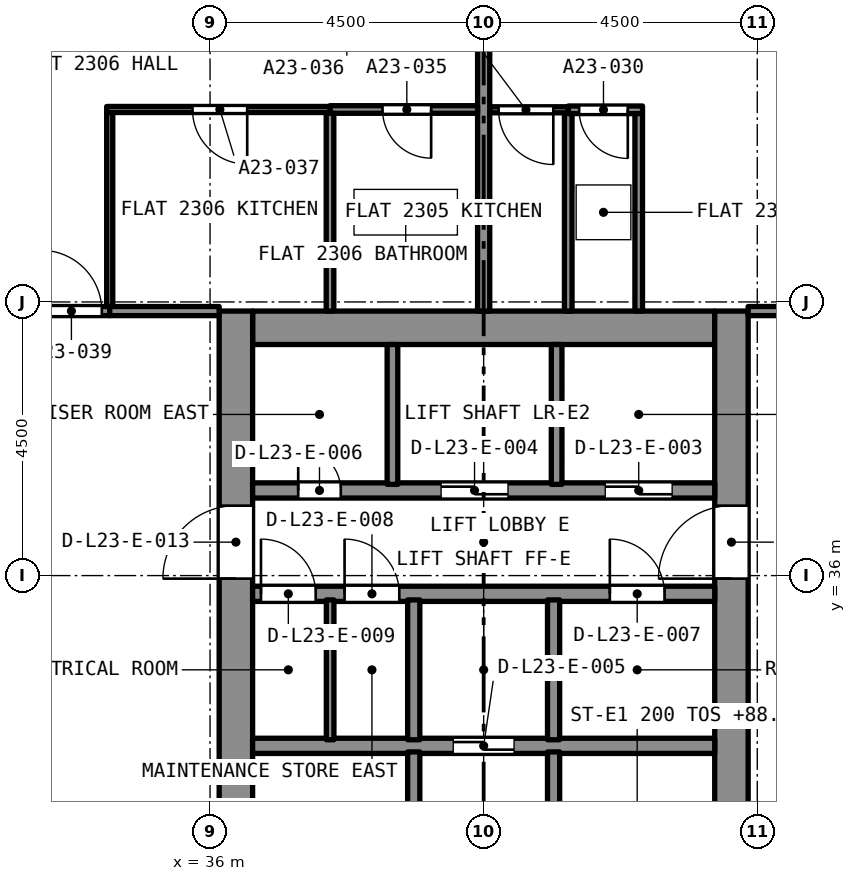
"""IFC4 building model, lengths in metres.
Left out: names, types, materials, properties, quantities, classifications, styles, units other than length and angle.
Written with IfcOpenShell. Run it as: python <this file> out.ifc"""

import sys

from ifc_helpers import new_model, si_unit, direction, frame, frame_2d, origin, place, context, subcontext, project, spatial, rectangle, extrude, element, fill, save


model = new_model("IFC4")
c1 = context("Model", 3, precision=1e-05, world=origin(), true_north=direction((0.0, 1.0)))
c2 = subcontext(c1, "Body", "Model", "MODEL_VIEW")
j1 = project(units=[si_unit("LENGTHUNIT", "METRE"), si_unit("PLANEANGLEUNIT", "RADIAN")], contexts=[c1])
p1 = place(None, origin())
s1 = spatial("IfcSite", under=j1, at=p1, CompositionType="ELEMENT")
p2 = place(p1, origin())
s2 = spatial("IfcBuilding", under=s1, at=p2, CompositionType="ELEMENT")
p3 = place(p2, frame((0.0, 0.0, 86.4)))
s3 = spatial("IfcBuildingStorey", under=s2, at=p3, CompositionType="ELEMENT", Elevation=86.4)
p4 = place(p3, frame((36.7, 40.075, 0.0), z_axis=(0.0, 0.0, 1.0), x_axis=(1.0, 0.0, 0.0)))
e1 = element("IfcWall", 1, at=p4, inside=s3, PredefinedType="SOLIDWALL", context=c2, shape_type="SweptSolid", body=[
    extrude(rectangle(XDim=7.6, YDim=0.55, at=frame_2d((3.8, 0.0))), origin(), (0.0, 0.0, 1.0), 3.2),
])
p5 = place(p3, frame((36.425, 27.15, 0.0), z_axis=(0.0, 0.0, 1.0), x_axis=(0.0, 1.0, 0.0)))
e2 = element("IfcWall", 2, at=p5, inside=s3, PredefinedType="SOLIDWALL", context=c2, shape_type="SweptSolid", body=[
    extrude(rectangle(XDim=13.2, YDim=0.55, at=frame_2d((6.6, 0.0))), origin(), (0.0, 0.0, 1.0), 3.2),
])
p6 = place(p5, frame((8.8, 0.0, 0.0)))
e3 = element("IfcOpeningElement", 3, at=p6, cuts=e2, PredefinedType="OPENING", context=c2, shape_type="SweptSolid", body=[
    extrude(rectangle(XDim=1.2, YDim=2.1, at=frame_2d((0.6, 1.05))), frame((0.0, 0.285, 0.0), z_axis=(0.0, -1.0, 0.0), x_axis=(1.0, 0.0, 0.0)), (0.0, 0.0, 1.0), 0.57),
])
p7 = place(p3, frame((44.575, 27.15, 0.0), z_axis=(0.0, 0.0, 1.0), x_axis=(0.0, 1.0, 0.0)))
e4 = element("IfcWall", 4, at=p7, inside=s3, PredefinedType="SOLIDWALL", context=c2, shape_type="SweptSolid", body=[
    extrude(rectangle(XDim=13.2, YDim=0.55, at=frame_2d((6.6, 0.0))), origin(), (0.0, 0.0, 1.0), 3.2),
])
p8 = place(p7, frame((8.8, 0.0, 0.0)))
e5 = element("IfcOpeningElement", 5, at=p8, cuts=e4, PredefinedType="OPENING", context=c2, shape_type="SweptSolid", body=[
    extrude(rectangle(XDim=1.2, YDim=2.1, at=frame_2d((0.6, 1.05))), frame((0.0, 0.285, 0.0), z_axis=(0.0, -1.0, 0.0), x_axis=(1.0, 0.0, 0.0)), (0.0, 0.0, 1.0), 0.57),
])
p9 = place(p3, frame((43.113, 43.66, 0.0), z_axis=(0.0, 0.0, 1.0), x_axis=(-1.0, 0.0, 0.0)))
e6 = element("IfcWall", 6, at=p9, inside=s3, PredefinedType="PARTITIONING", context=c2, shape_type="SweptSolid", body=[
    extrude(rectangle(XDim=1.222, YDim=0.125, at=frame_2d((0.611, 0.0))), origin(), (0.0, 0.0, 1.0), 2.9),
])
p10 = place(p9, frame((0.242, 0.0, 0.0)))
e7 = element("IfcOpeningElement", 7, at=p10, cuts=e6, PredefinedType="OPENING", context=c2, shape_type="SweptSolid", body=[
    extrude(rectangle(XDim=0.8, YDim=2.1, at=frame_2d((0.4, 1.05))), frame((0.0, 0.073, 0.0), z_axis=(0.0, -1.0, 0.0), x_axis=(1.0, 0.0, 0.0)), (0.0, 0.0, 1.0), 0.145),
])
for number, where, z_axis, x_axis in (
    (8, (43.05, 40.35, 0.0), (0.0, 0.0, 1.0), (0.0, 1.0, 0.0)),
    (9, (41.891, 40.35, 0.0), (0.0, 0.0, 1.0), (0.0, 1.0, 0.0)),
):
    element("IfcWall", number, at=place(p3, frame(where, z_axis=z_axis, x_axis=x_axis)), inside=s3, PredefinedType="PARTITIONING", context=c2, shape_type="SweptSolid", body=[
        extrude(rectangle(XDim=3.247, YDim=0.125, at=frame_2d((1.624, 0.0))), origin(), (0.0, 0.0, 1.0), 2.9),
    ])
p11 = place(p3, frame((41.891, 43.66, 0.0), z_axis=(0.0, 0.0, 1.0), x_axis=(-1.0, 0.0, 0.0)))
e10 = element("IfcWall", 10, at=p11, inside=s3, PredefinedType="PARTITIONING", context=c2, shape_type="SweptSolid", body=[
    extrude(rectangle(XDim=1.291, YDim=0.1, at=frame_2d((0.646, 0.0))), origin(), (0.0, 0.0, 1.0), 2.9),
])
p12 = place(p11, frame((0.246, 0.0, 0.0)))
e11 = element("IfcOpeningElement", 11, at=p12, cuts=e10, PredefinedType="OPENING", context=c2, shape_type="SweptSolid", body=[
    extrude(rectangle(XDim=0.9, YDim=2.1, at=frame_2d((0.45, 1.05))), frame((0.0, 0.06, 0.0), z_axis=(0.0, -1.0, 0.0), x_axis=(1.0, 0.0, 0.0)), (0.0, 0.0, 1.0), 0.12),
])
p13 = place(p3, frame((44.85, 40.35, 0.0), z_axis=(0.0, 0.0, 1.0), x_axis=(1.0, 0.0, 0.0)))
e12 = element("IfcWall", 12, at=p13, inside=s3, PredefinedType="PARTITIONING", context=c2, shape_type="SweptSolid", body=[
    extrude(rectangle(XDim=4.075, YDim=0.15, at=frame_2d((2.038, 0.0))), origin(), (0.0, 0.0, 1.0), 2.9),
])
p14 = place(p13, frame((1.9, 0.0, 0.0)))
e13 = element("IfcOpeningElement", 13, at=p14, cuts=e12, PredefinedType="OPENING", context=c2, shape_type="SweptSolid", body=[
    extrude(rectangle(XDim=1.0, YDim=2.1, at=frame_2d((0.5, 1.05))), frame((0.0, 0.085, 0.0), z_axis=(0.0, -1.0, 0.0), x_axis=(1.0, 0.0, 0.0)), (0.0, 0.0, 1.0), 0.17),
])
p15 = place(p3, frame((40.5, 40.35, 0.0), z_axis=(0.0, 0.0, 1.0), x_axis=(0.0, 1.0, 0.0)))
e14 = element("IfcWall", 14, at=p15, inside=s3, PredefinedType="PARTITIONING", context=c2, shape_type="SweptSolid", body=[
    extrude(rectangle(XDim=4.7, YDim=0.2, at=frame_2d((2.35, 0.0))), origin(), (0.0, 0.0, 1.0), 2.9),
])
p16 = place(p3, frame((40.4, 43.665, 0.0), z_axis=(0.0, 0.0, 1.0), x_axis=(-1.0, 0.0, 0.0)))
e15 = element("IfcWall", 15, at=p16, inside=s3, PredefinedType="PARTITIONING", context=c2, shape_type="SweptSolid", body=[
    extrude(rectangle(XDim=2.427, YDim=0.125, at=frame_2d((1.214, 0.0))), origin(), (0.0, 0.0, 1.0), 2.9),
])
p17 = place(p16, frame((0.764, 0.0, 0.0)))
e16 = element("IfcOpeningElement", 16, at=p17, cuts=e15, PredefinedType="OPENING", context=c2, shape_type="SweptSolid", body=[
    extrude(rectangle(XDim=0.8, YDim=2.1, at=frame_2d((0.4, 1.05))), frame((0.0, 0.073, 0.0), z_axis=(0.0, -1.0, 0.0), x_axis=(1.0, 0.0, 0.0)), (0.0, 0.0, 1.0), 0.145),
])
p18 = place(p3, frame((37.973, 40.35, 0.0), z_axis=(0.0, 0.0, 1.0), x_axis=(0.0, 1.0, 0.0)))
e17 = element("IfcWall", 17, at=p18, inside=s3, PredefinedType="PARTITIONING", context=c2, shape_type="SweptSolid", body=[
    extrude(rectangle(XDim=3.252, YDim=0.125, at=frame_2d((1.626, 0.0))), origin(), (0.0, 0.0, 1.0), 2.9),
])
p19 = place(p3, frame((37.973, 43.665, 0.0), z_axis=(0.0, 0.0, 1.0), x_axis=(-1.0, 0.0, 0.0)))
e18 = element("IfcWall", 18, at=p19, inside=s3, PredefinedType="PARTITIONING", context=c2, shape_type="SweptSolid", body=[
    extrude(rectangle(XDim=3.673, YDim=0.1, at=frame_2d((1.836, 0.0))), origin(), (0.0, 0.0, 1.0), 2.9),
])
p20 = place(p19, frame((1.361, 0.0, 0.0)))
e19 = element("IfcOpeningElement", 19, at=p20, cuts=e18, PredefinedType="OPENING", context=c2, shape_type="SweptSolid", body=[
    extrude(rectangle(XDim=0.9, YDim=2.1, at=frame_2d((0.45, 1.05))), frame((0.0, 0.06, 0.0), z_axis=(0.0, -1.0, 0.0), x_axis=(1.0, 0.0, 0.0)), (0.0, 0.0, 1.0), 0.12),
])
p21 = place(p3, frame((34.35, 40.425, 0.0), z_axis=(0.0, 0.0, 1.0), x_axis=(0.0, 1.0, 0.0)))
e20 = element("IfcWall", 20, at=p21, inside=s3, PredefinedType="PARTITIONING", context=c2, shape_type="SweptSolid", body=[
    extrude(rectangle(XDim=3.19, YDim=0.1, at=frame_2d((1.595, 0.0))), origin(), (0.0, 0.0, 1.0), 2.9),
])
p22 = place(p3, frame((32.075, 40.35, 0.0), z_axis=(0.0, 0.0, 1.0), x_axis=(1.0, 0.0, 0.0)))
e21 = element("IfcWall", 21, at=p22, inside=s3, PredefinedType="PARTITIONING", context=c2, shape_type="SweptSolid", body=[
    extrude(rectangle(XDim=2.275, YDim=0.15, at=frame_2d((1.138, 0.0))), origin(), (0.0, 0.0, 1.0), 2.9),
])
p23 = place(p22, frame((1.145, 0.0, 0.0)))
e22 = element("IfcOpeningElement", 22, at=p23, cuts=e21, PredefinedType="OPENING", context=c2, shape_type="SweptSolid", body=[
    extrude(rectangle(XDim=1.0, YDim=2.1, at=frame_2d((0.5, 1.05))), frame((0.0, 0.085, 0.0), z_axis=(0.0, -1.0, 0.0), x_axis=(1.0, 0.0, 0.0)), (0.0, 0.0, 1.0), 0.17),
])
p24 = place(p3, frame((34.35, 40.35, 0.0), z_axis=(0.0, 0.0, 1.0), x_axis=(1.0, 0.0, 0.0)))
e23 = element("IfcWall", 23, at=p24, inside=s3, PredefinedType="PARTITIONING", context=c2, shape_type="SweptSolid", body=[
    extrude(rectangle(XDim=1.8, YDim=0.15, at=frame_2d((0.9, 0.0))), origin(), (0.0, 0.0, 1.0), 2.9),
])
p25 = place(p3, frame((36.7, 33.2, 0.0), z_axis=(0.0, 0.0, 1.0), x_axis=(1.0, 0.0, 0.0)))
e24 = element("IfcWall", 24, at=p25, inside=s3, PredefinedType="SOLIDWALL", context=c2, shape_type="SweptSolid", body=[
    extrude(rectangle(XDim=7.6, YDim=0.25, at=frame_2d((3.8, 0.0))), origin(), (0.0, 0.0, 1.0), 2.9),
])
p26 = place(p25, frame((3.3, 0.0, 0.0)))
e25 = element("IfcOpeningElement", 25, at=p26, cuts=e24, PredefinedType="OPENING", context=c2, shape_type="SweptSolid", body=[
    extrude(rectangle(XDim=1.0, YDim=2.1, at=frame_2d((0.5, 1.05))), frame((0.0, 0.135, 0.0), z_axis=(0.0, -1.0, 0.0), x_axis=(1.0, 0.0, 0.0)), (0.0, 0.0, 1.0), 0.27),
])
p27 = place(p3, frame((36.7, 35.7, 0.0), z_axis=(0.0, 0.0, 1.0), x_axis=(1.0, 0.0, 0.0)))
e26 = element("IfcWall", 26, at=p27, inside=s3, PredefinedType="SOLIDWALL", context=c2, shape_type="SweptSolid", body=[
    extrude(rectangle(XDim=7.6, YDim=0.25, at=frame_2d((3.8, 0.0))), origin(), (0.0, 0.0, 1.0), 2.9),
])
p28 = place(p27, frame((5.875, 0.0, 0.0)))
e27 = element("IfcOpeningElement", 27, at=p28, cuts=e26, PredefinedType="OPENING", context=c2, shape_type="SweptSolid", body=[
    extrude(rectangle(XDim=0.9, YDim=2.1, at=frame_2d((0.45, 1.05))), frame((0.0, 0.135, 0.0), z_axis=(0.0, -1.0, 0.0), x_axis=(1.0, 0.0, 0.0)), (0.0, 0.0, 1.0), 0.27),
])
p29 = place(p27, frame((1.512, 0.0, 0.0)))
e28 = element("IfcOpeningElement", 28, at=p29, cuts=e26, PredefinedType="OPENING", context=c2, shape_type="SweptSolid", body=[
    extrude(rectangle(XDim=0.9, YDim=2.1, at=frame_2d((0.45, 1.05))), frame((0.0, 0.135, 0.0), z_axis=(0.0, -1.0, 0.0), x_axis=(1.0, 0.0, 0.0)), (0.0, 0.0, 1.0), 0.27),
])
p30 = place(p27, frame((0.137, 0.0, 0.0)))
e29 = element("IfcOpeningElement", 29, at=p30, cuts=e26, PredefinedType="OPENING", context=c2, shape_type="SweptSolid", body=[
    extrude(rectangle(XDim=0.9, YDim=2.1, at=frame_2d((0.45, 1.05))), frame((0.0, 0.135, 0.0), z_axis=(0.0, -1.0, 0.0), x_axis=(1.0, 0.0, 0.0)), (0.0, 0.0, 1.0), 0.27),
])
p31 = place(p3, frame((36.7, 37.4, 0.0), z_axis=(0.0, 0.0, 1.0), x_axis=(1.0, 0.0, 0.0)))
e30 = element("IfcWall", 30, at=p31, inside=s3, PredefinedType="SOLIDWALL", context=c2, shape_type="SweptSolid", body=[
    extrude(rectangle(XDim=7.6, YDim=0.25, at=frame_2d((3.8, 0.0))), origin(), (0.0, 0.0, 1.0), 2.9),
])
p32 = place(p31, frame((5.8, 0.0, 0.0)))
e31 = element("IfcOpeningElement", 31, at=p32, cuts=e30, PredefinedType="OPENING", context=c2, shape_type="SweptSolid", body=[
    extrude(rectangle(XDim=1.1, YDim=2.4, at=frame_2d((0.55, 1.2))), frame((0.0, 0.135, 0.0), z_axis=(0.0, -1.0, 0.0), x_axis=(1.0, 0.0, 0.0)), (0.0, 0.0, 1.0), 0.27),
])
p33 = place(p31, frame((3.1, 0.0, 0.0)))
e32 = element("IfcOpeningElement", 32, at=p33, cuts=e30, PredefinedType="OPENING", context=c2, shape_type="SweptSolid", body=[
    extrude(rectangle(XDim=1.1, YDim=2.4, at=frame_2d((0.55, 1.2))), frame((0.0, 0.135, 0.0), z_axis=(0.0, -1.0, 0.0), x_axis=(1.0, 0.0, 0.0)), (0.0, 0.0, 1.0), 0.27),
])
p34 = place(p31, frame((0.75, 0.0, 0.0)))
e33 = element("IfcOpeningElement", 33, at=p34, cuts=e30, PredefinedType="OPENING", context=c2, shape_type="SweptSolid", body=[
    extrude(rectangle(XDim=0.7, YDim=2.1, at=frame_2d((0.35, 1.05))), frame((0.0, 0.135, 0.0), z_axis=(0.0, -1.0, 0.0), x_axis=(1.0, 0.0, 0.0)), (0.0, 0.0, 1.0), 0.27),
])
p35 = place(p3, frame((41.65, 27.7, 0.0), z_axis=(0.0, 0.0, 1.0), x_axis=(0.0, 1.0, 0.0)))
e34 = element("IfcWall", 34, at=p35, inside=s3, PredefinedType="SOLIDWALL", context=c2, shape_type="SweptSolid", body=[
    extrude(rectangle(XDim=5.4, YDim=0.2, at=frame_2d((2.7, 0.0))), origin(), (0.0, 0.0, 1.0), 2.9),
])
p36 = place(p35, frame((0.2, 0.0, 0.0)))
e35 = element("IfcOpeningElement", 35, at=p36, cuts=e34, PredefinedType="OPENING", context=c2, shape_type="SweptSolid", body=[
    extrude(rectangle(XDim=0.9, YDim=2.1, at=frame_2d((0.45, 1.05))), frame((0.0, 0.11, 0.0), z_axis=(0.0, -1.0, 0.0), x_axis=(1.0, 0.0, 0.0)), (0.0, 0.0, 1.0), 0.22),
])
p37 = place(p3, frame((39.35, 27.7, 0.0), z_axis=(0.0, 0.0, 1.0), x_axis=(0.0, 1.0, 0.0)))
e36 = element("IfcWall", 36, at=p37, inside=s3, PredefinedType="SOLIDWALL", context=c2, shape_type="SweptSolid", body=[
    extrude(rectangle(XDim=5.4, YDim=0.2, at=frame_2d((2.7, 0.0))), origin(), (0.0, 0.0, 1.0), 2.9),
])
p38 = place(p37, frame((0.2, 0.0, 0.0)))
e37 = element("IfcOpeningElement", 37, at=p38, cuts=e36, PredefinedType="OPENING", context=c2, shape_type="SweptSolid", body=[
    extrude(rectangle(XDim=0.9, YDim=2.1, at=frame_2d((0.45, 1.05))), frame((0.0, 0.11, 0.0), z_axis=(0.0, -1.0, 0.0), x_axis=(1.0, 0.0, 0.0)), (0.0, 0.0, 1.0), 0.22),
])
for number, where, z_axis, x_axis in (
    (38, (41.65, 33.3, 0.0), (0.0, 0.0, 1.0), (0.0, 1.0, 0.0)),
    (39, (39.35, 33.3, 0.0), (0.0, 0.0, 1.0), (0.0, 1.0, 0.0)),
):
    element("IfcWall", number, at=place(p3, frame(where, z_axis=z_axis, x_axis=x_axis)), inside=s3, PredefinedType="SOLIDWALL", context=c2, shape_type="SweptSolid", body=[
        extrude(rectangle(XDim=2.3, YDim=0.2, at=frame_2d((1.15, 0.0))), origin(), (0.0, 0.0, 1.0), 2.9),
    ])
for number, where, z_axis, x_axis in (
    (40, (41.7, 37.5, 0.0), (0.0, 0.0, 1.0), (0.0, 1.0, 0.0)),
    (41, (39.0, 37.5, 0.0), (0.0, 0.0, 1.0), (0.0, 1.0, 0.0)),
):
    element("IfcWall", number, at=place(p3, frame(where, z_axis=z_axis, x_axis=x_axis)), inside=s3, PredefinedType="SOLIDWALL", context=c2, shape_type="SweptSolid", body=[
        extrude(rectangle(XDim=2.3, YDim=0.175, at=frame_2d((1.15, 0.0))), origin(), (0.0, 0.0, 1.0), 2.9),
    ])
p39 = place(p3, frame((37.975, 33.3, 0.0), z_axis=(0.0, 0.0, 1.0), x_axis=(0.0, 1.0, 0.0)))
e42 = element("IfcWall", 42, at=p39, inside=s3, PredefinedType="PARTITIONING", context=c2, shape_type="SweptSolid", body=[
    extrude(rectangle(XDim=2.3, YDim=0.125, at=frame_2d((1.15, 0.0))), origin(), (0.0, 0.0, 1.0), 2.9),
])
p40 = place(p10, origin())
e43 = element("IfcDoor", 43, at=p40, inside=s3, OperationType="SINGLE_SWING_RIGHT", PredefinedType="DOOR", context=c2, shape_type="SweptSolid", body=[
    extrude(rectangle(XDim=0.8, YDim=2.1, at=frame_2d((0.4, 1.05))), frame((0.0, 0.025, 0.0), z_axis=(0.0, -1.0, 0.0), x_axis=(1.0, 0.0, 0.0)), (0.0, 0.0, 1.0), 0.05),
])
fill(e7, e43)
p41 = place(p12, origin())
e44 = element("IfcDoor", 44, at=p41, inside=s3, OperationType="SINGLE_SWING_RIGHT", PredefinedType="DOOR", context=c2, shape_type="SweptSolid", body=[
    extrude(rectangle(XDim=0.9, YDim=2.1, at=frame_2d((0.45, 1.05))), frame((0.0, 0.025, 0.0), z_axis=(0.0, -1.0, 0.0), x_axis=(1.0, 0.0, 0.0)), (0.0, 0.0, 1.0), 0.05),
])
fill(e11, e44)
p42 = place(p17, origin())
e45 = element("IfcDoor", 45, at=p42, inside=s3, OperationType="SINGLE_SWING_LEFT", PredefinedType="DOOR", context=c2, shape_type="SweptSolid", body=[
    extrude(rectangle(XDim=0.8, YDim=2.1, at=frame_2d((0.4, 1.05))), frame((0.0, 0.025, 0.0), z_axis=(0.0, -1.0, 0.0), x_axis=(1.0, 0.0, 0.0)), (0.0, 0.0, 1.0), 0.05),
])
fill(e16, e45)
p43 = place(p20, origin())
e46 = element("IfcDoor", 46, at=p43, inside=s3, OperationType="SINGLE_SWING_LEFT", PredefinedType="DOOR", context=c2, shape_type="SweptSolid", body=[
    extrude(rectangle(XDim=0.9, YDim=2.1, at=frame_2d((0.45, 1.05))), frame((0.0, 0.025, 0.0), z_axis=(0.0, -1.0, 0.0), x_axis=(1.0, 0.0, 0.0)), (0.0, 0.0, 1.0), 0.05),
])
fill(e19, e46)
p44 = place(p23, origin())
e47 = element("IfcDoor", 47, at=p44, inside=s3, OperationType="SINGLE_SWING_RIGHT", PredefinedType="DOOR", context=c2, shape_type="SweptSolid", body=[
    extrude(rectangle(XDim=1.0, YDim=2.1, at=frame_2d((0.5, 1.05))), frame((0.0, 0.025, 0.0), z_axis=(0.0, -1.0, 0.0), x_axis=(1.0, 0.0, 0.0)), (0.0, 0.0, 1.0), 0.05),
])
fill(e22, e47)
p45 = place(p32, origin())
e48 = element("IfcDoor", 48, at=p45, inside=s3, OperationType="SLIDING_TO_LEFT", PredefinedType="DOOR", context=c2, shape_type="SweptSolid", body=[
    extrude(rectangle(XDim=1.1, YDim=2.4, at=frame_2d((0.55, 1.2))), frame((0.0, 0.025, 0.0), z_axis=(0.0, -1.0, 0.0), x_axis=(1.0, 0.0, 0.0)), (0.0, 0.0, 1.0), 0.05),
])
fill(e31, e48)
p46 = place(p33, origin())
e49 = element("IfcDoor", 49, at=p46, inside=s3, OperationType="SLIDING_TO_LEFT", PredefinedType="DOOR", context=c2, shape_type="SweptSolid", body=[
    extrude(rectangle(XDim=1.1, YDim=2.4, at=frame_2d((0.55, 1.2))), frame((0.0, 0.025, 0.0), z_axis=(0.0, -1.0, 0.0), x_axis=(1.0, 0.0, 0.0)), (0.0, 0.0, 1.0), 0.05),
])
fill(e32, e49)
p47 = place(p26, origin())
e50 = element("IfcDoor", 50, at=p47, inside=s3, OperationType="SLIDING_TO_LEFT", PredefinedType="DOOR", context=c2, shape_type="SweptSolid", body=[
    extrude(rectangle(XDim=1.0, YDim=2.1, at=frame_2d((0.5, 1.05))), frame((0.0, 0.025, 0.0), z_axis=(0.0, -1.0, 0.0), x_axis=(1.0, 0.0, 0.0)), (0.0, 0.0, 1.0), 0.05),
])
fill(e25, e50)
p48 = place(p34, origin())
e51 = element("IfcDoor", 51, at=p48, inside=s3, OperationType="SINGLE_SWING_LEFT", PredefinedType="DOOR", context=c2, shape_type="SweptSolid", body=[
    extrude(rectangle(XDim=0.7, YDim=2.1, at=frame_2d((0.35, 1.05))), frame((0.0, 0.025, 0.0), z_axis=(0.0, -1.0, 0.0), x_axis=(1.0, 0.0, 0.0)), (0.0, 0.0, 1.0), 0.05),
])
fill(e33, e51)
p49 = place(p28, origin())
e52 = element("IfcDoor", 52, at=p49, inside=s3, OperationType="SINGLE_SWING_LEFT", PredefinedType="DOOR", context=c2, shape_type="SweptSolid", body=[
    extrude(rectangle(XDim=0.9, YDim=2.1, at=frame_2d((0.45, 1.05))), frame((0.0, 0.025, 0.0), z_axis=(0.0, -1.0, 0.0), x_axis=(1.0, 0.0, 0.0)), (0.0, 0.0, 1.0), 0.05),
])
fill(e27, e52)
p50 = place(p29, origin())
e53 = element("IfcDoor", 53, at=p50, inside=s3, OperationType="SINGLE_SWING_LEFT", PredefinedType="DOOR", context=c2, shape_type="SweptSolid", body=[
    extrude(rectangle(XDim=0.9, YDim=2.1, at=frame_2d((0.45, 1.05))), frame((0.0, 0.025, 0.0), z_axis=(0.0, -1.0, 0.0), x_axis=(1.0, 0.0, 0.0)), (0.0, 0.0, 1.0), 0.05),
])
fill(e28, e53)
p51 = place(p30, origin())
e54 = element("IfcDoor", 54, at=p51, inside=s3, OperationType="SINGLE_SWING_LEFT", PredefinedType="DOOR", context=c2, shape_type="SweptSolid", body=[
    extrude(rectangle(XDim=0.9, YDim=2.1, at=frame_2d((0.45, 1.05))), frame((0.0, 0.025, 0.0), z_axis=(0.0, -1.0, 0.0), x_axis=(1.0, 0.0, 0.0)), (0.0, 0.0, 1.0), 0.05),
])
fill(e29, e54)
p52 = place(p6, origin())
e55 = element("IfcDoor", 55, at=p52, inside=s3, OperationType="SINGLE_SWING_LEFT", PredefinedType="DOOR", context=c2, shape_type="SweptSolid", body=[
    extrude(rectangle(XDim=1.2, YDim=2.1, at=frame_2d((0.6, 1.05))), frame((0.0, 0.025, 0.0), z_axis=(0.0, -1.0, 0.0), x_axis=(1.0, 0.0, 0.0)), (0.0, 0.0, 1.0), 0.05),
])
fill(e3, e55)
p53 = place(p8, origin())
e56 = element("IfcDoor", 56, at=p53, inside=s3, OperationType="SINGLE_SWING_LEFT", PredefinedType="DOOR", context=c2, shape_type="SweptSolid", body=[
    extrude(rectangle(XDim=1.2, YDim=2.1, at=frame_2d((0.6, 1.05))), frame((0.0, 0.025, 0.0), z_axis=(0.0, -1.0, 0.0), x_axis=(1.0, 0.0, 0.0)), (0.0, 0.0, 1.0), 0.05),
])
fill(e5, e56)
save(model, sys.argv[1])
